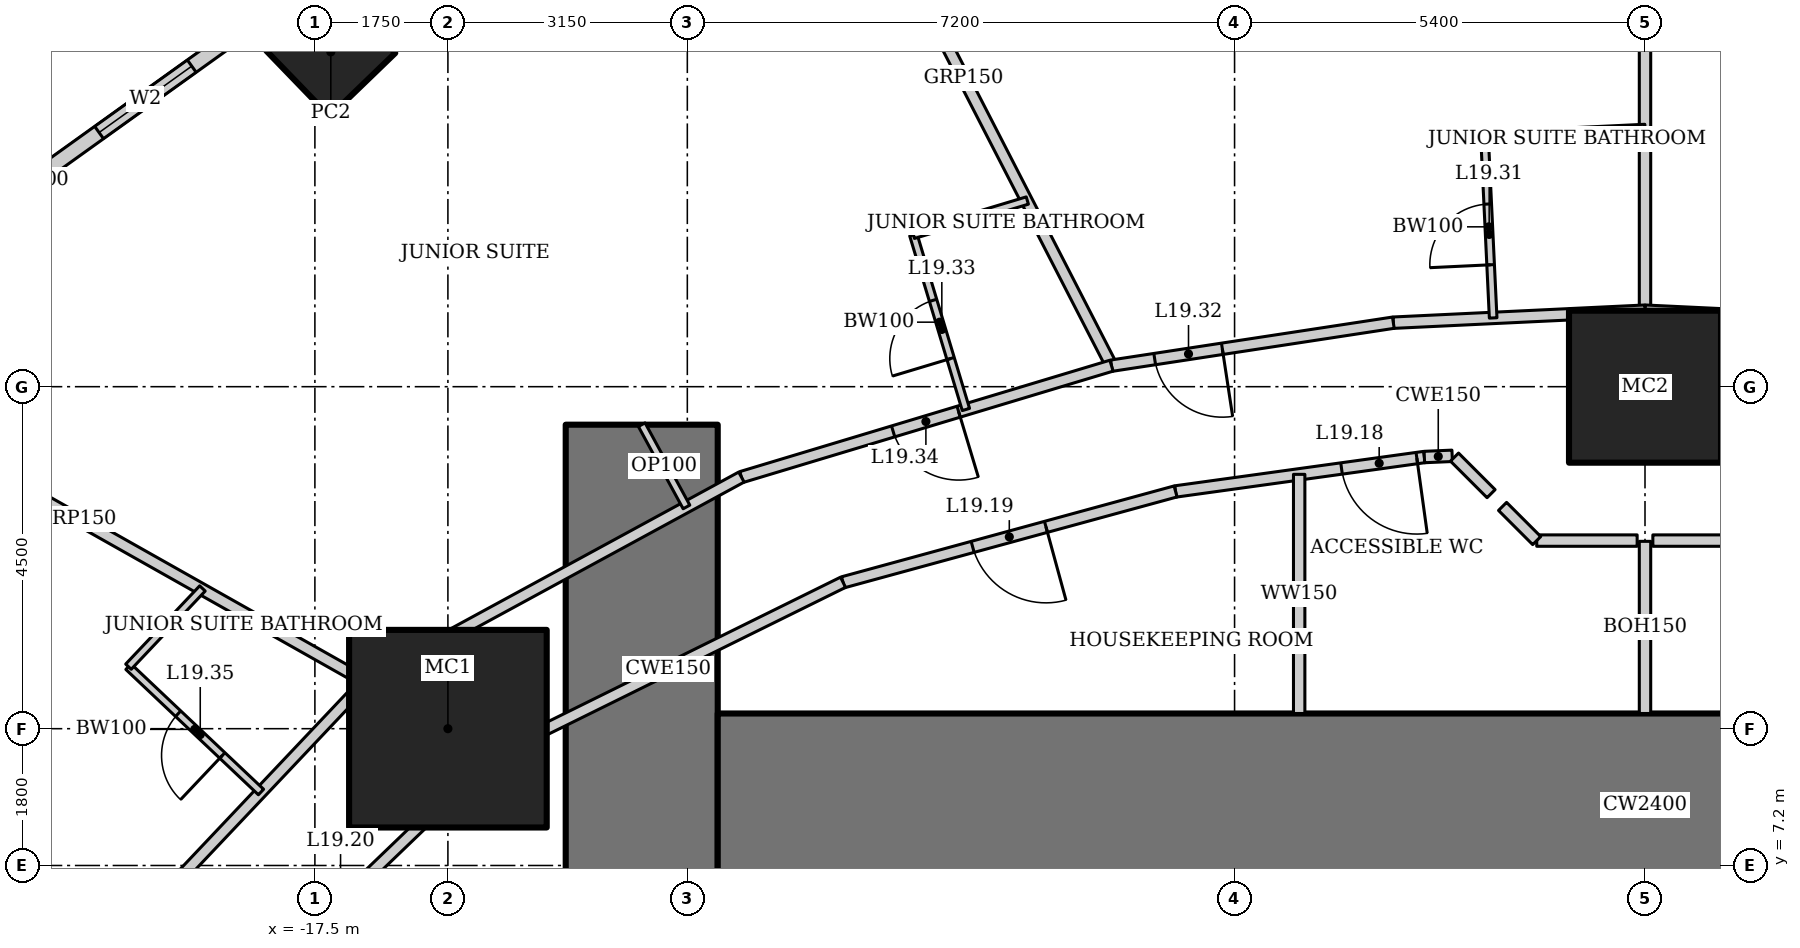
"""IFC4 building model, lengths in metres.
Left out: names, types, materials, properties, quantities, classifications, styles, units other than length and angle.
Written with IfcOpenShell. Run it as: python <this file> out.ifc"""

import sys

from ifc_helpers import new_model, si_unit, direction, frame, frame_2d, origin, origin_2d, place, context, subcontext, project, spatial, rectangle, hollow_rectangle, extrude, element, fill, save


model = new_model("IFC4")
c1 = context("Model", 3, precision=1e-05, world=origin(), true_north=direction((0.0, 1.0)))
c2 = subcontext(c1, "Body", "Model", "MODEL_VIEW")
j1 = project(units=[si_unit("LENGTHUNIT", "METRE"), si_unit("PLANEANGLEUNIT", "RADIAN")], contexts=[c1])
p1 = place(None, origin())
s1 = spatial("IfcSite", under=j1, at=p1, CompositionType="ELEMENT")
p2 = place(p1, origin())
s2 = spatial("IfcBuilding", under=s1, at=p2, CompositionType="ELEMENT")
p3 = place(p2, frame((0.0, 0.0, 83.8)))
s3 = spatial("IfcBuildingStorey", under=s2, at=p3, CompositionType="ELEMENT", Elevation=83.8)
p4 = place(p3, frame((0.0, 13.5, 0.0), z_axis=(0.0, 0.0, 1.0), x_axis=(1.0, 0.0, 0.0)))
e1 = element("IfcColumn", 1, at=p4, inside=s3, PredefinedType="COLUMN", context=c2, shape_type="SweptSolid", body=[
    extrude(hollow_rectangle(XDim=2.0, YDim=2.0, WallThickness=0.17, at=origin_2d()), origin(), (0.0, 0.0, 1.0), 3.6),
])
p5 = place(p3, frame((-15.75, 9.0, 0.0), z_axis=(0.0, 0.0, 1.0), x_axis=(1.0, 0.0, 0.0)))
e2 = element("IfcColumn", 2, at=p5, inside=s3, PredefinedType="COLUMN", context=c2, shape_type="SweptSolid", body=[
    extrude(hollow_rectangle(XDim=2.6, YDim=2.6, WallThickness=0.13, at=origin_2d()), origin(), (0.0, 0.0, 1.0), 3.6),
])
p6 = place(p3, frame((-17.291, 17.905, 0.0), z_axis=(0.0, 0.0, 1.0), x_axis=(0.719339800339, 0.694658370459, 0.0)))
e3 = element("IfcColumn", 3, at=p6, inside=s3, PredefinedType="COLUMN", context=c2, shape_type="SweptSolid", body=[
    extrude(hollow_rectangle(XDim=1.2, YDim=1.2, WallThickness=0.1, at=origin_2d()), origin(), (0.0, 0.0, 1.0), 3.6),
])
p7 = place(p3, frame((-13.2, 13.0, 0.0), z_axis=(0.0, 0.0, 1.0), x_axis=(0.0, -1.0, 0.0)))
e4 = element("IfcWall", 4, at=p7, inside=s3, PredefinedType="SHEAR", context=c2, shape_type="SweptSolid", body=[
    extrude(rectangle(XDim=26.0, YDim=2.0, at=frame_2d((13.0, 0.0))), origin(), (0.0, 0.0, 1.0), 3.6),
])
p8 = place(p7, frame((12.1, 0.0, 0.0)))
e5 = element("IfcOpeningElement", 5, at=p8, cuts=e4, PredefinedType="OPENING", context=c2, shape_type="SweptSolid", body=[
    extrude(rectangle(XDim=1.8, YDim=2.1, at=frame_2d((0.9, 1.05))), frame((0.0, 1.01, 0.0), z_axis=(0.0, -1.0, 0.0), x_axis=(1.0, 0.0, 0.0)), (0.0, 0.0, 1.0), 2.02),
])
p9 = place(p3, frame((12.2, 8.0, 0.0), z_axis=(0.0, 0.0, 1.0), x_axis=(-1.0, 0.0, 0.0)))
e6 = element("IfcWall", 6, at=p9, inside=s3, PredefinedType="SHEAR", context=c2, shape_type="SweptSolid", body=[
    extrude(rectangle(XDim=24.4, YDim=2.4, at=frame_2d((12.2, 0.0))), origin(), (0.0, 0.0, 1.0), 3.6),
])
p10 = place(p3, frame((-17.929, 18.572, 0.0), z_axis=(0.0, 0.0, 1.0), x_axis=(-0.812791321576, -0.582554948112, 0.0)))
e7 = element("IfcWall", 7, at=p10, inside=s3, PredefinedType="SOLIDWALL", context=c2, shape_type="SweptSolid", body=[
    extrude(rectangle(XDim=8.063, YDim=0.2, at=frame_2d((4.032, 0.0))), origin(), (0.0, 0.0, 1.0), 3.45),
])
p11 = place(p10, frame((1.466, 0.0, 0.5)))
e8 = element("IfcOpeningElement", 8, at=p11, cuts=e7, PredefinedType="OPENING", context=c2, shape_type="SweptSolid", body=[
    extrude(rectangle(XDim=1.5, YDim=2.2, at=frame_2d((0.75, 1.1))), frame((0.0, 0.11, 0.0), z_axis=(0.0, -1.0, 0.0), x_axis=(1.0, 0.0, 0.0)), (0.0, 0.0, 1.0), 0.22),
])
p12 = place(p10, frame((5.097, 0.0, 0.5)))
e9 = element("IfcOpeningElement", 9, at=p12, cuts=e7, PredefinedType="OPENING", context=c2, shape_type="SweptSolid", body=[
    extrude(rectangle(XDim=1.5, YDim=2.2, at=frame_2d((0.75, 1.1))), frame((0.0, 0.11, 0.0), z_axis=(0.0, -1.0, 0.0), x_axis=(1.0, 0.0, 0.0)), (0.0, 0.0, 1.0), 0.22),
])
p13 = place(p3, frame((0.0, 22.825, 0.0), z_axis=(0.0, 0.0, 1.0), x_axis=(0.0, -1.0, 0.0)))
e10 = element("IfcWall", 10, at=p13, inside=s3, PredefinedType="PARTITIONING", context=c2, shape_type="SweptSolid", body=[
    extrude(rectangle(XDim=8.325, YDim=0.15, at=frame_2d((4.162, 0.0))), origin(), (0.0, 0.0, 1.0), 2.924),
])
p14 = place(p3, frame((-10.912, 21.346, 0.0), z_axis=(0.0, 0.0, 1.0), x_axis=(0.457327273085, -0.889298468059, 0.0)))
e11 = element("IfcWall", 11, at=p14, inside=s3, PredefinedType="PARTITIONING", context=c2, shape_type="SweptSolid", body=[
    extrude(rectangle(XDim=8.511, YDim=0.15, at=frame_2d((4.256, 0.0))), origin(), (0.0, 0.0, 1.0), 2.528),
])
p15 = place(p3, frame((-24.435, 13.909, 0.0), z_axis=(0.0, 0.0, 1.0), x_axis=(0.87090601027, -0.491449612143, 0.0)))
e12 = element("IfcWall", 12, at=p15, inside=s3, PredefinedType="PARTITIONING", context=c2, shape_type="SweptSolid", body=[
    extrude(rectangle(XDim=8.726, YDim=0.15, at=frame_2d((4.363, 0.0))), origin(), (0.0, 0.0, 1.0), 2.693),
])
p16 = place(p3, frame((3.311, 14.342, 0.0), z_axis=(0.0, 0.0, 1.0), x_axis=(-0.998863968075, 0.047652631422, 0.0)))
e13 = element("IfcWall", 13, at=p16, inside=s3, PredefinedType="PARTITIONING", context=c2, shape_type="SweptSolid", body=[
    extrude(rectangle(XDim=3.315, YDim=0.15, at=frame_2d((1.657, 0.0))), origin(), (0.0, 0.0, 1.0), 3.45),
])
p17 = place(p16, frame((0.15, 0.0, 0.0)))
e14 = element("IfcOpeningElement", 14, at=p17, cuts=e13, PredefinedType="OPENING", context=c2, shape_type="SweptSolid", body=[
    extrude(rectangle(XDim=0.9, YDim=2.1, at=frame_2d((0.45, 1.05))), frame((0.0, 0.085, 0.0), z_axis=(0.0, -1.0, 0.0), x_axis=(1.0, 0.0, 0.0)), (0.0, 0.0, 1.0), 0.17),
])
p18 = place(p3, frame((0.0, 14.5, 0.0), z_axis=(0.0, 0.0, 1.0), x_axis=(-0.998863968075, -0.047652631422, 0.0)))
e15 = element("IfcWall", 15, at=p18, inside=s3, PredefinedType="PARTITIONING", context=c2, shape_type="SweptSolid", body=[
    extrude(rectangle(XDim=3.315, YDim=0.15, at=frame_2d((1.657, 0.0))), origin(), (0.0, 0.0, 1.0), 3.45),
])
p19 = place(p3, frame((-3.311, 14.342, 0.0), z_axis=(0.0, 0.0, 1.0), x_axis=(-0.988564270062, -0.150800145746, 0.0)))
e16 = element("IfcWall", 16, at=p19, inside=s3, PredefinedType="PARTITIONING", context=c2, shape_type="SweptSolid", body=[
    extrude(rectangle(XDim=3.751, YDim=0.15, at=frame_2d((1.875, 0.0))), origin(), (0.0, 0.0, 1.0), 3.45),
])
p20 = place(p19, frame((2.276, 0.0, 0.0)))
e17 = element("IfcOpeningElement", 17, at=p20, cuts=e16, PredefinedType="OPENING", context=c2, shape_type="SweptSolid", body=[
    extrude(rectangle(XDim=0.9, YDim=2.1, at=frame_2d((0.45, 1.05))), frame((0.0, 0.085, 0.0), z_axis=(0.0, -1.0, 0.0), x_axis=(1.0, 0.0, 0.0)), (0.0, 0.0, 1.0), 0.17),
])
p21 = place(p3, frame((-7.019, 13.776, 0.0), z_axis=(0.0, 0.0, 1.0), x_axis=(-0.957564241242, -0.288219922793, 0.0)))
e18 = element("IfcWall", 18, at=p21, inside=s3, PredefinedType="PARTITIONING", context=c2, shape_type="SweptSolid", body=[
    extrude(rectangle(XDim=5.085, YDim=0.15, at=frame_2d((2.542, 0.0))), origin(), (0.0, 0.0, 1.0), 3.45),
])
p22 = place(p21, frame((2.1, 0.0, 0.0)))
e19 = element("IfcOpeningElement", 19, at=p22, cuts=e18, PredefinedType="OPENING", context=c2, shape_type="SweptSolid", body=[
    extrude(rectangle(XDim=0.9, YDim=2.1, at=frame_2d((0.45, 1.05))), frame((0.0, 0.085, 0.0), z_axis=(0.0, -1.0, 0.0), x_axis=(1.0, 0.0, 0.0)), (0.0, 0.0, 1.0), 0.17),
])
p23 = place(p3, frame((-11.888, 12.311, 0.0), z_axis=(0.0, 0.0, 1.0), x_axis=(-0.878450059298, -0.477834169267, 0.0)))
e20 = element("IfcWall", 20, at=p23, inside=s3, PredefinedType="PARTITIONING", context=c2, shape_type="SweptSolid", body=[
    extrude(rectangle(XDim=5.631, YDim=0.15, at=frame_2d((2.815, 0.0))), origin(), (0.0, 0.0, 1.0), 3.45),
])
p24 = place(p3, frame((-16.835, 9.62, 0.0), z_axis=(0.0, 0.0, 1.0), x_axis=(-0.687062608696, -0.726598218916, 0.0)))
e21 = element("IfcWall", 21, at=p24, inside=s3, PredefinedType="PARTITIONING", context=c2, shape_type="SweptSolid", body=[
    extrude(rectangle(XDim=6.039, YDim=0.15, at=frame_2d((3.02, 0.0))), origin(), (0.0, 0.0, 1.0), 3.45),
])
p25 = place(p3, frame((-2.903, 12.574, 0.0), z_axis=(0.0, 0.0, 1.0), x_axis=(-0.990563451353, -0.137054911782, 0.0)))
e22 = element("IfcWall", 22, at=p25, inside=s3, PredefinedType="PARTITIONING", context=c2, shape_type="SweptSolid", body=[
    extrude(rectangle(XDim=3.304, YDim=0.15, at=frame_2d((1.652, 0.0))), origin(), (0.0, 0.0, 1.0), 3.45),
])
p26 = place(p25, frame((0.1, 0.0, 0.0)))
e23 = element("IfcOpeningElement", 23, at=p26, cuts=e22, PredefinedType="OPENING", context=c2, shape_type="SweptSolid", body=[
    extrude(rectangle(XDim=1.0, YDim=2.1, at=frame_2d((0.5, 1.05))), frame((0.0, 0.085, 0.0), z_axis=(0.0, -1.0, 0.0), x_axis=(1.0, 0.0, 0.0)), (0.0, 0.0, 1.0), 0.17),
])
p27 = place(p3, frame((-6.176, 12.122, 0.0), z_axis=(0.0, 0.0, 1.0), x_axis=(-0.964644466646, -0.263554648923, 0.0)))
e24 = element("IfcWall", 24, at=p27, inside=s3, PredefinedType="PARTITIONING", context=c2, shape_type="SweptSolid", body=[
    extrude(rectangle(XDim=4.535, YDim=0.15, at=frame_2d((2.268, 0.0))), origin(), (0.0, 0.0, 1.0), 3.45),
])
p28 = place(p27, frame((1.768, 0.0, 0.0)))
e25 = element("IfcOpeningElement", 25, at=p28, cuts=e24, PredefinedType="OPENING", context=c2, shape_type="SweptSolid", body=[
    extrude(rectangle(XDim=1.0, YDim=2.1, at=frame_2d((0.5, 1.05))), frame((0.0, 0.085, 0.0), z_axis=(0.0, -1.0, 0.0), x_axis=(1.0, 0.0, 0.0)), (0.0, 0.0, 1.0), 0.17),
])
p29 = place(p3, frame((-10.551, 10.926, 0.0), z_axis=(0.0, 0.0, 1.0), x_axis=(-0.89656943448, -0.442903205177, 0.0)))
e26 = element("IfcWall", 26, at=p29, inside=s3, PredefinedType="PARTITIONING", context=c2, shape_type="SweptSolid", body=[
    extrude(rectangle(XDim=5.126, YDim=0.15, at=frame_2d((2.563, 0.0))), origin(), (0.0, 0.0, 1.0), 3.45),
])
p30 = place(p3, frame((-15.147, 8.656, 0.0), z_axis=(0.0, 0.0, 1.0), x_axis=(-0.720837261072, -0.693104352209, 0.0)))
e27 = element("IfcWall", 27, at=p30, inside=s3, PredefinedType="PARTITIONING", context=c2, shape_type="SweptSolid", body=[
    extrude(rectangle(XDim=5.59, YDim=0.15, at=frame_2d((2.795, 0.0))), origin(), (0.0, 0.0, 1.0), 3.45),
])
p31 = place(p30, frame((2.295, 0.0, 0.0)))
e28 = element("IfcOpeningElement", 28, at=p31, cuts=e27, PredefinedType="OPENING", context=c2, shape_type="SweptSolid", body=[
    extrude(rectangle(XDim=1.0, YDim=2.1, at=frame_2d((0.5, 1.05))), frame((0.0, 0.085, 0.0), z_axis=(0.0, -1.0, 0.0), x_axis=(1.0, 0.0, 0.0)), (0.0, 0.0, 1.0), 0.17),
])
p32 = place(p3, frame((-4.55, 9.2, 0.0), z_axis=(0.0, 0.0, 1.0), x_axis=(0.0, 1.0, 0.0)))
e29 = element("IfcWall", 29, at=p32, inside=s3, PredefinedType="SOLIDWALL", context=c2, shape_type="SweptSolid", body=[
    extrude(rectangle(XDim=3.147, YDim=0.15, at=frame_2d((1.573, 0.0))), origin(), (0.0, 0.0, 1.0), 3.45),
])
p33 = place(p3, frame((-1.998, 14.405, 0.0), z_axis=(0.0, 0.0, 1.0), x_axis=(-0.047608648396, 0.998866065395, 0.0)))
e30 = element("IfcWall", 30, at=p33, inside=s3, PredefinedType="PARTITIONING", context=c2, shape_type="SweptSolid", body=[
    extrude(rectangle(XDim=2.4, YDim=0.1, at=frame_2d((1.2, 0.0))), origin(), (0.0, 0.0, 1.0), 2.749),
])
p34 = place(p33, frame((0.7, 0.0, 0.0)))
e31 = element("IfcOpeningElement", 31, at=p34, cuts=e30, PredefinedType="OPENING", context=c2, shape_type="SweptSolid", body=[
    extrude(rectangle(XDim=0.8, YDim=2.1, at=frame_2d((0.4, 1.05))), frame((0.0, 0.06, 0.0), z_axis=(0.0, -1.0, 0.0), x_axis=(1.0, 0.0, 0.0)), (0.0, 0.0, 1.0), 0.12),
])
p35 = place(p3, frame((-2.112, 16.802, 0.0), z_axis=(0.0, 0.0, 1.0), x_axis=(0.998862383453, 0.047685835668, 0.0)))
e32 = element("IfcWall", 32, at=p35, inside=s3, PredefinedType="PARTITIONING", context=c2, shape_type="SweptSolid", body=[
    extrude(rectangle(XDim=2.115, YDim=0.1, at=frame_2d((1.057, 0.0))), origin(), (0.0, 0.0, 1.0), 3.45),
])
p36 = place(p3, frame((-8.935, 13.2, 0.0), z_axis=(0.0, 0.0, 1.0), x_axis=(-0.288197066254, 0.957571120598, 0.0)))
e33 = element("IfcWall", 33, at=p36, inside=s3, PredefinedType="PARTITIONING", context=c2, shape_type="SweptSolid", body=[
    extrude(rectangle(XDim=2.4, YDim=0.1, at=frame_2d((1.2, 0.0))), origin(), (0.0, 0.0, 1.0), 3.45),
])
p37 = place(p36, frame((0.7, 0.0, 0.0)))
e34 = element("IfcOpeningElement", 34, at=p37, cuts=e33, PredefinedType="OPENING", context=c2, shape_type="SweptSolid", body=[
    extrude(rectangle(XDim=0.8, YDim=2.1, at=frame_2d((0.4, 1.05))), frame((0.0, 0.06, 0.0), z_axis=(0.0, -1.0, 0.0), x_axis=(1.0, 0.0, 0.0)), (0.0, 0.0, 1.0), 0.12),
])
p38 = place(p3, frame((-9.626, 15.498, 0.0), z_axis=(0.0, 0.0, 1.0), x_axis=(0.957551231109, 0.288263143328, 0.0)))
e35 = element("IfcWall", 35, at=p38, inside=s3, PredefinedType="PARTITIONING", context=c2, shape_type="SweptSolid", body=[
    extrude(rectangle(XDim=1.566, YDim=0.1, at=frame_2d((0.783, 0.0))), origin(), (0.0, 0.0, 1.0), 3.45),
])
p39 = place(p3, frame((-18.209, 8.167, 0.0), z_axis=(0.0, 0.0, 1.0), x_axis=(-0.726567238928, 0.687095369885, 0.0)))
e36 = element("IfcWall", 36, at=p39, inside=s3, PredefinedType="PARTITIONING", context=c2, shape_type="SweptSolid", body=[
    extrude(rectangle(XDim=2.4, YDim=0.1, at=frame_2d((1.2, 0.0))), origin(), (0.0, 0.0, 1.0), 3.45),
])
p40 = place(p39, frame((0.7, 0.0, 0.0)))
e37 = element("IfcOpeningElement", 37, at=p40, cuts=e36, PredefinedType="OPENING", context=c2, shape_type="SweptSolid", body=[
    extrude(rectangle(XDim=0.8, YDim=2.1, at=frame_2d((0.4, 1.05))), frame((0.0, 0.06, 0.0), z_axis=(0.0, -1.0, 0.0), x_axis=(1.0, 0.0, 0.0)), (0.0, 0.0, 1.0), 0.12),
])
p41 = place(p3, frame((-19.953, 9.816, 0.0), z_axis=(0.0, 0.0, 1.0), x_axis=(0.687017997787, 0.726640399866, 0.0)))
e38 = element("IfcWall", 38, at=p41, inside=s3, PredefinedType="PARTITIONING", context=c2, shape_type="SweptSolid", body=[
    extrude(rectangle(XDim=1.417, YDim=0.1, at=frame_2d((0.708, 0.0))), origin(), (0.0, 0.0, 1.0), 3.45),
])
p42 = place(p3, frame((-13.2, 13.0, 0.0), z_axis=(0.0, 0.0, 1.0), x_axis=(0.477852414256, -0.878440134665, 0.0)))
e39 = element("IfcWall", 39, at=p42, inside=s3, PredefinedType="PARTITIONING", context=c2, shape_type="SweptSolid", body=[
    extrude(rectangle(XDim=1.232, YDim=0.1, at=frame_2d((0.616, 0.0))), origin(), (0.0, 0.0, 1.0), 3.45),
])
p43 = place(p3, frame((-2.537, 12.59, 0.0), z_axis=(0.0, 0.0, 1.0), x_axis=(-0.999061181733, -0.04332153223, 0.0)))
e40 = element("IfcWall", 40, at=p43, inside=s3, PredefinedType="PARTITIONING", context=c2, shape_type="SweptSolid", body=[
    extrude(rectangle(XDim=0.366, YDim=0.15, at=frame_2d((0.183, 0.0))), origin(), (0.0, 0.0, 1.0), 3.45),
])
p44 = place(p3, frame((0.0, 9.2, 0.0), z_axis=(0.0, 0.0, 1.0), x_axis=(0.0, 1.0, 0.0)))
e41 = element("IfcWall", 41, at=p44, inside=s3, PredefinedType="PARTITIONING", context=c2, shape_type="SweptSolid", body=[
    extrude(rectangle(XDim=2.265, YDim=0.15, at=frame_2d((1.133, 0.0))), origin(), (0.0, 0.0, 1.0), 3.043),
])
p45 = place(p3, frame((1.425, 11.475, 0.0), z_axis=(0.0, 0.0, 1.0), x_axis=(-1.0, 0.0, 0.0)))
e42 = element("IfcWall", 42, at=p45, inside=s3, PredefinedType="PARTITIONING", context=c2, shape_type="SweptSolid", body=[
    extrude(rectangle(XDim=1.321, YDim=0.15, at=frame_2d((0.661, 0.0))), origin(), (0.0, 0.0, 1.0), 3.45),
])
p46 = place(p3, frame((-2.025, 12.092, 0.0), z_axis=(0.0, 0.0, 1.0), x_axis=(-0.707106781187, 0.707106781187, 0.0)))
e43 = element("IfcWall", 43, at=p46, inside=s3, PredefinedType="PARTITIONING", context=c2, shape_type="SweptSolid", body=[
    extrude(rectangle(XDim=0.681, YDim=0.15, at=frame_2d((0.34, 0.0))), origin(), (0.0, 0.0, 1.0), 3.45),
])
p47 = place(p3, frame((-0.103, 11.475, 0.0), z_axis=(0.0, 0.0, 1.0), x_axis=(-1.0, 0.0, 0.0)))
e44 = element("IfcWall", 44, at=p47, inside=s3, PredefinedType="PARTITIONING", context=c2, shape_type="SweptSolid", body=[
    extrude(rectangle(XDim=1.321, YDim=0.15, at=frame_2d((0.661, 0.0))), origin(), (0.0, 0.0, 1.0), 3.45),
])
p48 = place(p3, frame((-1.425, 11.475, 0.0), z_axis=(0.0, 0.0, 1.0), x_axis=(-0.707106781187, 0.707106781187, 0.0)))
e45 = element("IfcWall", 45, at=p48, inside=s3, PredefinedType="PARTITIONING", context=c2, shape_type="SweptSolid", body=[
    extrude(rectangle(XDim=0.636, YDim=0.15, at=frame_2d((0.318, 0.0))), origin(), (0.0, 0.0, 1.0), 3.45),
])
p49 = place(p11, origin())
e46 = element("IfcWindow", 46, at=p49, inside=s3, PartitioningType="SINGLE_PANEL", PredefinedType="WINDOW", context=c2, shape_type="SweptSolid", body=[
    extrude(rectangle(XDim=1.5, YDim=2.2, at=frame_2d((0.75, 1.1))), frame((0.0, 0.03, 0.0), z_axis=(0.0, -1.0, 0.0), x_axis=(1.0, 0.0, 0.0)), (0.0, 0.0, 1.0), 0.06),
])
fill(e8, e46)
p50 = place(p26, origin())
e47 = element("IfcDoor", 47, at=p50, inside=s3, OperationType="SINGLE_SWING_LEFT", PredefinedType="DOOR", context=c2, shape_type="SweptSolid", body=[
    extrude(rectangle(XDim=1.0, YDim=2.1, at=frame_2d((0.5, 1.05))), frame((0.0, 0.025, 0.0), z_axis=(0.0, -1.0, 0.0), x_axis=(1.0, 0.0, 0.0)), (0.0, 0.0, 1.0), 0.05),
])
fill(e23, e47)
p51 = place(p28, origin())
e48 = element("IfcDoor", 48, at=p51, inside=s3, OperationType="SINGLE_SWING_LEFT", PredefinedType="DOOR", context=c2, shape_type="SweptSolid", body=[
    extrude(rectangle(XDim=1.0, YDim=2.1, at=frame_2d((0.5, 1.05))), frame((0.0, 0.025, 0.0), z_axis=(0.0, -1.0, 0.0), x_axis=(1.0, 0.0, 0.0)), (0.0, 0.0, 1.0), 0.05),
])
fill(e25, e48)
p52 = place(p34, origin())
e49 = element("IfcDoor", 49, at=p52, inside=s3, OperationType="SINGLE_SWING_LEFT", PredefinedType="DOOR", context=c2, shape_type="SweptSolid", body=[
    extrude(rectangle(XDim=0.8, YDim=2.1, at=frame_2d((0.4, 1.05))), frame((0.0, 0.025, 0.0), z_axis=(0.0, -1.0, 0.0), x_axis=(1.0, 0.0, 0.0)), (0.0, 0.0, 1.0), 0.05),
])
fill(e31, e49)
p53 = place(p20, origin())
e50 = element("IfcDoor", 50, at=p53, inside=s3, OperationType="SINGLE_SWING_LEFT", PredefinedType="DOOR", context=c2, shape_type="SweptSolid", body=[
    extrude(rectangle(XDim=0.9, YDim=2.1, at=frame_2d((0.45, 1.05))), frame((0.0, 0.025, 0.0), z_axis=(0.0, -1.0, 0.0), x_axis=(1.0, 0.0, 0.0)), (0.0, 0.0, 1.0), 0.05),
])
fill(e17, e50)
p54 = place(p37, origin())
e51 = element("IfcDoor", 51, at=p54, inside=s3, OperationType="SINGLE_SWING_LEFT", PredefinedType="DOOR", context=c2, shape_type="SweptSolid", body=[
    extrude(rectangle(XDim=0.8, YDim=2.1, at=frame_2d((0.4, 1.05))), frame((0.0, 0.025, 0.0), z_axis=(0.0, -1.0, 0.0), x_axis=(1.0, 0.0, 0.0)), (0.0, 0.0, 1.0), 0.05),
])
fill(e34, e51)
p55 = place(p22, origin())
e52 = element("IfcDoor", 52, at=p55, inside=s3, OperationType="SINGLE_SWING_LEFT", PredefinedType="DOOR", context=c2, shape_type="SweptSolid", body=[
    extrude(rectangle(XDim=0.9, YDim=2.1, at=frame_2d((0.45, 1.05))), frame((0.0, 0.025, 0.0), z_axis=(0.0, -1.0, 0.0), x_axis=(1.0, 0.0, 0.0)), (0.0, 0.0, 1.0), 0.05),
])
fill(e19, e52)
p56 = place(p40, origin())
e53 = element("IfcDoor", 53, at=p56, inside=s3, OperationType="SINGLE_SWING_LEFT", PredefinedType="DOOR", context=c2, shape_type="SweptSolid", body=[
    extrude(rectangle(XDim=0.8, YDim=2.1, at=frame_2d((0.4, 1.05))), frame((0.0, 0.025, 0.0), z_axis=(0.0, -1.0, 0.0), x_axis=(1.0, 0.0, 0.0)), (0.0, 0.0, 1.0), 0.05),
])
fill(e37, e53)
save(model, sys.argv[1])
